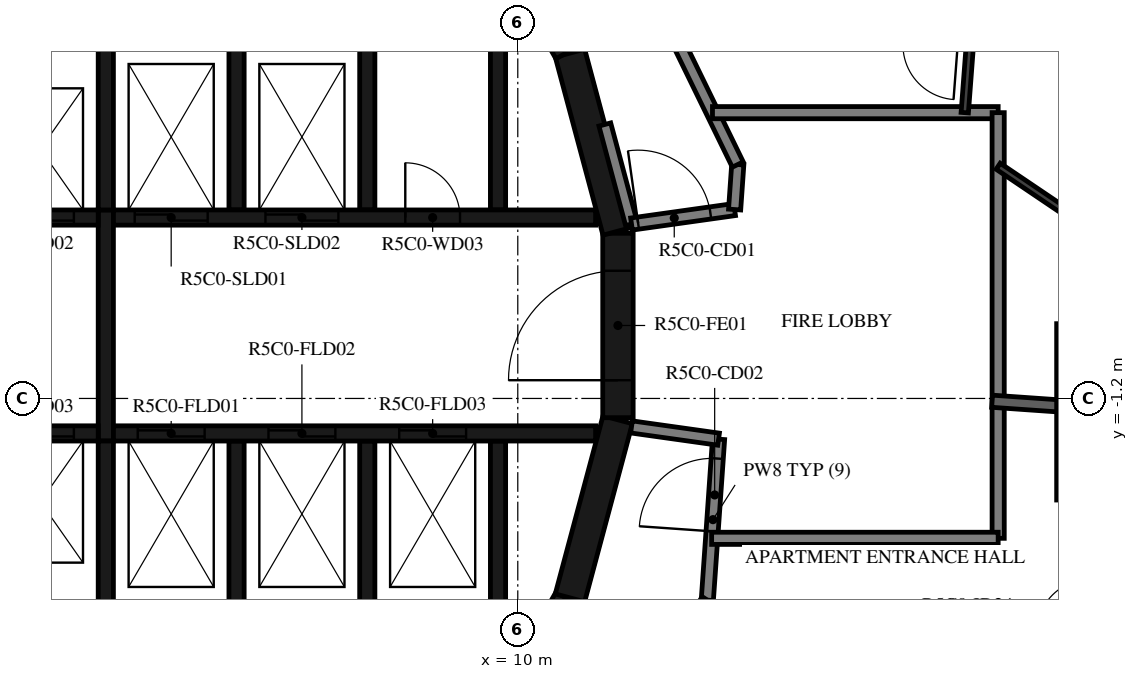
"""IFC4 building model, lengths in metres.
Left out: names, types, materials, properties, quantities, classifications, styles, units other than length and angle.
Written with IfcOpenShell. Run it as: python <this file> out.ifc"""

import sys

from ifc_helpers import new_model, si_unit, direction, frame, frame_2d, origin, place, context, subcontext, project, spatial, polyline, rectangle, outline, extrude, element, fill, save


model = new_model("IFC4")
c1 = context("Model", 3, precision=1e-05, world=origin(), true_north=direction((0.0, 1.0)))
c2 = subcontext(c1, "Body", "Model", "MODEL_VIEW")
j1 = project(units=[si_unit("LENGTHUNIT", "METRE"), si_unit("PLANEANGLEUNIT", "RADIAN")], contexts=[c1])
p1 = place(None, origin())
s1 = spatial("IfcSite", under=j1, at=p1, CompositionType="ELEMENT")
p2 = place(p1, origin())
s2 = spatial("IfcBuilding", under=s1, at=p2, CompositionType="ELEMENT")
p3 = place(p2, frame((0.0, 0.0, 209.4)))
s3 = spatial("IfcBuildingStorey", under=s2, at=p3, CompositionType="ELEMENT", Elevation=209.4)
for number, where, z_axis, x_axis in (
    (1, (9.329, -7.137, 0.0), (0.0, 0.0, 1.0), (0.5, 0.866, 0.0)),
    (2, (10.858, -4.479, 0.0), (0.0, 0.0, 1.0), (0.259, 0.966, 0.0)),
):
    element("IfcWall", number, at=place(p3, frame(where, z_axis=z_axis, x_axis=x_axis)), inside=s3, PredefinedType="SHEAR", context=c2, shape_type="SweptSolid", body=[
        extrude(rectangle(XDim=3.033, YDim=0.5, at=frame_2d((1.516, 0.0))), origin(), (0.0, 0.0, 1.0), 3.12),
    ])
p4 = place(p3, frame((11.647, -1.516, 0.0), z_axis=(0.0, 0.0, 1.0), x_axis=(0.0, 1.0, 0.0)))
e3 = element("IfcWall", 3, at=p4, inside=s3, PredefinedType="SHEAR", context=c2, shape_type="SweptSolid", body=[
    extrude(rectangle(XDim=3.033, YDim=0.5, at=frame_2d((1.516, 0.0))), origin(), (0.0, 0.0, 1.0), 3.12),
])
p5 = place(p4, frame((0.616, 0.0, 0.0)))
e4 = element("IfcOpeningElement", 4, at=p5, cuts=e3, PredefinedType="OPENING", context=c2, shape_type="SweptSolid", body=[
    extrude(rectangle(XDim=1.8, YDim=2.1, at=frame_2d((0.9, 1.05))), frame((0.0, 0.26, 0.0), z_axis=(0.0, -1.0, 0.0), x_axis=(1.0, 0.0, 0.0)), (0.0, 0.0, 1.0), 0.52),
])
for number, where, z_axis, x_axis in (
    (5, (11.643, 1.55, 0.0), (0.0, 0.0, 1.0), (-0.259, 0.966, 0.0)),
    (6, (10.845, 4.51, 0.0), (0.0, 0.0, 1.0), (-0.5, 0.866, 0.0)),
):
    element("IfcWall", number, at=place(p3, frame(where, z_axis=z_axis, x_axis=x_axis)), inside=s3, PredefinedType="SHEAR", context=c2, shape_type="SweptSolid", body=[
        extrude(rectangle(XDim=3.033, YDim=0.5, at=frame_2d((1.516, 0.0))), origin(), (0.0, 0.0, 1.0), 3.12),
    ])
p6 = place(p3, origin())
e7 = element("IfcWall", 7, at=p6, inside=s3, PredefinedType="SHEAR", context=c2, shape_type="SweptSolid", body=[
    extrude(outline(polyline([(-9.55, 4.8), (-5.5, 4.8), (-5.5, 1.9), (-5.25, 1.9), (-5.25, 4.8), (-1.2, 4.8), (-1.2, 1.9), (-0.95, 1.9), (-0.95, 4.8), (0.95, 4.8), (0.95, 1.9), (1.2, 1.9), (1.2, 4.8), (3.1, 4.8), (3.1, 1.9), (3.35, 1.9), (3.35, 4.8), (5.25, 4.8), (5.25, 1.9), (5.5, 1.9), (5.5, 4.8), (7.4, 4.8), (7.4, 1.9), (7.65, 1.9), (7.65, 4.8), (9.55, 4.8), (9.55, 1.9), (9.8, 1.9), (9.8, 4.8), (9.8, 5.05), (-9.8, 5.05), (-9.8, 4.8), (-9.8, 1.9), (-9.55, 1.9), (-9.55, 4.8)])), origin(), (0.0, 0.0, 1.0), 3.12),
])
p7 = place(p3, origin())
e8 = element("IfcWall", 8, at=p7, inside=s3, PredefinedType="SHEAR", context=c2, shape_type="SweptSolid", body=[
    extrude(outline(polyline([(9.8, -5.05), (9.8, -4.8), (9.8, -1.9), (9.55, -1.9), (9.55, -4.8), (7.65, -4.8), (7.65, -1.9), (7.4, -1.9), (7.4, -4.8), (5.5, -4.8), (5.5, -1.9), (5.25, -1.9), (5.25, -4.8), (3.35, -4.8), (3.35, -1.9), (3.1, -1.9), (3.1, -4.8), (1.2, -4.8), (1.2, -1.9), (0.95, -1.9), (0.95, -4.8), (-5.25, -4.8), (-5.25, -1.9), (-5.5, -1.9), (-5.5, -4.8), (-7.4, -4.8), (-7.4, -1.9), (-7.65, -1.9), (-7.65, -4.8), (-9.55, -4.8), (-9.55, -1.9), (-9.8, -1.9), (-9.8, -4.8), (-9.8, -5.05), (9.8, -5.05)])), origin(), (0.0, 0.0, 1.0), 3.12),
])
p8 = place(p3, frame((-11.28, 1.775, 0.0), z_axis=(0.0, 0.0, 1.0), x_axis=(1.0, 0.0, 0.0)))
e9 = element("IfcWall", 9, at=p8, inside=s3, PredefinedType="SHEAR", context=c2, shape_type="SweptSolid", body=[
    extrude(rectangle(XDim=14.38, YDim=0.25, at=frame_2d((7.19, 0.0))), origin(), (0.0, 0.0, 1.0), 3.12),
])
p9 = place(p8, frame((10.73, 0.0, 0.0)))
e10 = element("IfcOpeningElement", 10, at=p9, cuts=e9, PredefinedType="OPENING", context=c2, shape_type="SweptSolid", body=[
    extrude(rectangle(XDim=1.1, YDim=2.1, at=frame_2d((0.55, 1.05))), frame((0.0, 0.135, 0.0), z_axis=(0.0, -1.0, 0.0), x_axis=(1.0, 0.0, 0.0)), (0.0, 0.0, 1.0), 0.27),
])
p10 = place(p8, frame((12.88, 0.0, 0.0)))
e11 = element("IfcOpeningElement", 11, at=p10, cuts=e9, PredefinedType="OPENING", context=c2, shape_type="SweptSolid", body=[
    extrude(rectangle(XDim=1.1, YDim=2.1, at=frame_2d((0.55, 1.05))), frame((0.0, 0.135, 0.0), z_axis=(0.0, -1.0, 0.0), x_axis=(1.0, 0.0, 0.0)), (0.0, 0.0, 1.0), 0.27),
])
p11 = place(p8, frame((3.305, 0.0, 0.0)))
e12 = element("IfcOpeningElement", 12, at=p11, cuts=e9, PredefinedType="OPENING", context=c2, shape_type="SweptSolid", body=[
    extrude(rectangle(XDim=0.9, YDim=2.1, at=frame_2d((0.45, 1.05))), frame((0.0, 0.135, 0.0), z_axis=(0.0, -1.0, 0.0), x_axis=(1.0, 0.0, 0.0)), (0.0, 0.0, 1.0), 0.27),
])
p12 = place(p8, frame((7.605, 0.0, 0.0)))
e13 = element("IfcOpeningElement", 13, at=p12, cuts=e9, PredefinedType="OPENING", context=c2, shape_type="SweptSolid", body=[
    extrude(rectangle(XDim=0.9, YDim=2.1, at=frame_2d((0.45, 1.05))), frame((0.0, 0.135, 0.0), z_axis=(0.0, -1.0, 0.0), x_axis=(1.0, 0.0, 0.0)), (0.0, 0.0, 1.0), 0.27),
])
p13 = place(p3, frame((3.35, 1.775, 0.0), z_axis=(0.0, 0.0, 1.0), x_axis=(1.0, 0.0, 0.0)))
e14 = element("IfcWall", 14, at=p13, inside=s3, PredefinedType="SHEAR", context=c2, shape_type="SweptSolid", body=[
    extrude(rectangle(XDim=7.93, YDim=0.25, at=frame_2d((3.965, 0.0))), origin(), (0.0, 0.0, 1.0), 3.12),
])
p14 = place(p13, frame((0.35, 0.0, 0.0)))
e15 = element("IfcOpeningElement", 15, at=p14, cuts=e14, PredefinedType="OPENING", context=c2, shape_type="SweptSolid", body=[
    extrude(rectangle(XDim=1.2, YDim=2.4, at=frame_2d((0.6, 1.2))), frame((0.0, 0.135, 0.0), z_axis=(0.0, -1.0, 0.0), x_axis=(1.0, 0.0, 0.0)), (0.0, 0.0, 1.0), 0.27),
])
p15 = place(p13, frame((2.5, 0.0, 0.0)))
e16 = element("IfcOpeningElement", 16, at=p15, cuts=e14, PredefinedType="OPENING", context=c2, shape_type="SweptSolid", body=[
    extrude(rectangle(XDim=1.2, YDim=2.4, at=frame_2d((0.6, 1.2))), frame((0.0, 0.135, 0.0), z_axis=(0.0, -1.0, 0.0), x_axis=(1.0, 0.0, 0.0)), (0.0, 0.0, 1.0), 0.27),
])
p16 = place(p13, frame((4.8, 0.0, 0.0)))
e17 = element("IfcOpeningElement", 17, at=p16, cuts=e14, PredefinedType="OPENING", context=c2, shape_type="SweptSolid", body=[
    extrude(rectangle(XDim=0.9, YDim=2.1, at=frame_2d((0.45, 1.05))), frame((0.0, 0.135, 0.0), z_axis=(0.0, -1.0, 0.0), x_axis=(1.0, 0.0, 0.0)), (0.0, 0.0, 1.0), 0.27),
])
p17 = place(p3, frame((-11.28, -1.775, 0.0), z_axis=(0.0, 0.0, 1.0), x_axis=(1.0, 0.0, 0.0)))
e18 = element("IfcWall", 18, at=p17, inside=s3, PredefinedType="SHEAR", context=c2, shape_type="SweptSolid", body=[
    extrude(rectangle(XDim=14.38, YDim=0.25, at=frame_2d((7.19, 0.0))), origin(), (0.0, 0.0, 1.0), 3.12),
])
p18 = place(p17, frame((12.88, 0.0, 0.0)))
e19 = element("IfcOpeningElement", 19, at=p18, cuts=e18, PredefinedType="OPENING", context=c2, shape_type="SweptSolid", body=[
    extrude(rectangle(XDim=1.1, YDim=2.1, at=frame_2d((0.55, 1.05))), frame((0.0, 0.135, 0.0), z_axis=(0.0, -1.0, 0.0), x_axis=(1.0, 0.0, 0.0)), (0.0, 0.0, 1.0), 0.27),
])
p19 = place(p17, frame((8.68, 0.0, 0.0)))
e20 = element("IfcOpeningElement", 20, at=p19, cuts=e18, PredefinedType="OPENING", context=c2, shape_type="SweptSolid", body=[
    extrude(rectangle(XDim=0.9, YDim=2.1, at=frame_2d((0.45, 1.05))), frame((0.0, 0.135, 0.0), z_axis=(0.0, -1.0, 0.0), x_axis=(1.0, 0.0, 0.0)), (0.0, 0.0, 1.0), 0.27),
])
p20 = place(p3, frame((3.35, -1.775, 0.0), z_axis=(0.0, 0.0, 1.0), x_axis=(1.0, 0.0, 0.0)))
e21 = element("IfcWall", 21, at=p20, inside=s3, PredefinedType="SHEAR", context=c2, shape_type="SweptSolid", body=[
    extrude(rectangle(XDim=7.93, YDim=0.25, at=frame_2d((3.965, 0.0))), origin(), (0.0, 0.0, 1.0), 3.12),
])
p21 = place(p20, frame((0.4, 0.0, 0.0)))
e22 = element("IfcOpeningElement", 22, at=p21, cuts=e21, PredefinedType="OPENING", context=c2, shape_type="SweptSolid", body=[
    extrude(rectangle(XDim=1.1, YDim=2.4, at=frame_2d((0.55, 1.2))), frame((0.0, 0.135, 0.0), z_axis=(0.0, -1.0, 0.0), x_axis=(1.0, 0.0, 0.0)), (0.0, 0.0, 1.0), 0.27),
])
p22 = place(p20, frame((2.55, 0.0, 0.0)))
e23 = element("IfcOpeningElement", 23, at=p22, cuts=e21, PredefinedType="OPENING", context=c2, shape_type="SweptSolid", body=[
    extrude(rectangle(XDim=1.1, YDim=2.4, at=frame_2d((0.55, 1.2))), frame((0.0, 0.135, 0.0), z_axis=(0.0, -1.0, 0.0), x_axis=(1.0, 0.0, 0.0)), (0.0, 0.0, 1.0), 0.27),
])
p23 = place(p20, frame((4.7, 0.0, 0.0)))
e24 = element("IfcOpeningElement", 24, at=p23, cuts=e21, PredefinedType="OPENING", context=c2, shape_type="SweptSolid", body=[
    extrude(rectangle(XDim=1.1, YDim=2.4, at=frame_2d((0.55, 1.2))), frame((0.0, 0.135, 0.0), z_axis=(0.0, -1.0, 0.0), x_axis=(1.0, 0.0, 0.0)), (0.0, 0.0, 1.0), 0.27),
])
p24 = place(p3, frame((3.225, -1.9, 0.0), z_axis=(0.0, 0.0, 1.0), x_axis=(0.0, 1.0, 0.0)))
e25 = element("IfcWall", 25, at=p24, inside=s3, PredefinedType="SHEAR", context=c2, shape_type="SweptSolid", body=[
    extrude(rectangle(XDim=3.8, YDim=0.25, at=frame_2d((1.9, 0.0))), origin(), (0.0, 0.0, 1.0), 3.12),
])
p25 = place(p3, frame((11.87, 1.668, 0.0), z_axis=(0.0, 0.0, 1.0), x_axis=(-0.258836880648, 0.965921047093, 0.0)))
e26 = element("IfcWall", 26, at=p25, inside=s3, PredefinedType="STANDARD", context=c2, shape_type="SweptSolid", body=[
    extrude(rectangle(XDim=1.695, YDim=0.2, at=frame_2d((0.848, 0.0))), origin(), (0.0, 0.0, 1.0), 3.12),
])
p26 = place(p3, frame((11.87, 1.668, 0.0), z_axis=(0.0, 0.0, 1.0), x_axis=(0.990271931984, 0.139145609792, 0.0)))
e27 = element("IfcWall", 27, at=p26, inside=s3, PredefinedType="STANDARD", context=c2, shape_type="SweptSolid", body=[
    extrude(rectangle(XDim=1.712, YDim=0.2, at=frame_2d((0.856, 0.0))), origin(), (0.0, 0.0, 1.0), 3.12),
])
p27 = place(p26, frame((0.11, 0.0, 0.0)))
e28 = element("IfcOpeningElement", 28, at=p27, cuts=e27, PredefinedType="OPENING", context=c2, shape_type="SweptSolid", body=[
    extrude(rectangle(XDim=1.2, YDim=2.1, at=frame_2d((0.6, 1.05))), frame((0.0, 0.11, 0.0), z_axis=(0.0, -1.0, 0.0), x_axis=(1.0, 0.0, 0.0)), (0.0, 0.0, 1.0), 0.22),
])
p28 = place(p3, frame((13.566, 1.906, 0.0), z_axis=(0.0, 0.0, 1.0), x_axis=(0.07005495793, 0.997543133338, 0.0)))
e29 = element("IfcWall", 29, at=p28, inside=s3, PredefinedType="STANDARD", context=c2, shape_type="SweptSolid", body=[
    extrude(rectangle(XDim=0.742, YDim=0.2, at=frame_2d((0.371, 0.0))), origin(), (0.0, 0.0, 1.0), 3.12),
])
p29 = place(p3, frame((13.618, 2.647, 0.0), z_axis=(0.0, 0.0, 1.0), x_axis=(-0.438366026218, 0.898796543751, 0.0)))
e30 = element("IfcWall", 30, at=p29, inside=s3, PredefinedType="STANDARD", context=c2, shape_type="SweptSolid", body=[
    extrude(rectangle(XDim=7.181, YDim=0.2, at=frame_2d((3.591, 0.0))), origin(), (0.0, 0.0, 1.0), 3.12),
])
p30 = place(p3, frame((13.117, -4.517, 0.0), z_axis=(0.0, 0.0, 1.0), x_axis=(0.069736659613, 0.997565435601, 0.0)))
e31 = element("IfcWall", 31, at=p30, inside=s3, PredefinedType="STANDARD", context=c2, shape_type="SweptSolid", body=[
    extrude(rectangle(XDim=2.654, YDim=0.2, at=frame_2d((1.327, 0.0))), origin(), (0.0, 0.0, 1.0), 3.12),
])
p31 = place(p30, frame((1.134, 0.0, 0.0)))
e32 = element("IfcOpeningElement", 32, at=p31, cuts=e31, PredefinedType="OPENING", context=c2, shape_type="SweptSolid", body=[
    extrude(rectangle(XDim=1.2, YDim=2.1, at=frame_2d((0.6, 1.05))), frame((0.0, 0.11, 0.0), z_axis=(0.0, -1.0, 0.0), x_axis=(1.0, 0.0, 0.0)), (0.0, 0.0, 1.0), 0.22),
])
p32 = place(p3, frame((13.302, -1.869, 0.0), z_axis=(0.0, 0.0, 1.0), x_axis=(-0.990274397042, 0.13912806533, 0.0)))
e33 = element("IfcWall", 33, at=p32, inside=s3, PredefinedType="STANDARD", context=c2, shape_type="SweptSolid", body=[
    extrude(rectangle(XDim=1.446, YDim=0.2, at=frame_2d((0.723, 0.0))), origin(), (0.0, 0.0, 1.0), 3.12),
])
p33 = place(p3, frame((9.101, -10.47, 0.0), z_axis=(0.0, 0.0, 1.0), x_axis=(0.559195469534, 0.829035841718, 0.0)))
e34 = element("IfcWall", 34, at=p33, inside=s3, PredefinedType="STANDARD", context=c2, shape_type="SweptSolid", body=[
    extrude(rectangle(XDim=7.181, YDim=0.2, at=frame_2d((3.591, 0.0))), origin(), (0.0, 0.0, 1.0), 3.12),
])
p34 = place(p3, frame((17.9, 3.5, 0.0), z_axis=(0.0, 0.0, 1.0), x_axis=(-1.0, 0.0, 0.0)))
e35 = element("IfcWall", 35, at=p34, inside=s3, PredefinedType="STANDARD", context=c2, shape_type="SweptSolid", body=[
    extrude(rectangle(XDim=4.698, YDim=0.2, at=frame_2d((2.349, 0.0))), origin(), (0.0, 0.0, 1.0), 3.12),
])
p35 = place(p3, frame((17.9, -3.5, 0.0), z_axis=(0.0, 0.0, 1.0), x_axis=(0.0, 1.0, 0.0)))
e36 = element("IfcWall", 36, at=p35, inside=s3, PredefinedType="STANDARD", context=c2, shape_type="SweptSolid", body=[
    extrude(rectangle(XDim=7.0, YDim=0.2, at=frame_2d((3.5, 0.0))), origin(), (0.0, 0.0, 1.0), 3.12),
])
p36 = place(p3, frame((13.188, -3.5, 0.0), z_axis=(0.0, 0.0, 1.0), x_axis=(1.0, 0.0, 0.0)))
e37 = element("IfcWall", 37, at=p36, inside=s3, PredefinedType="STANDARD", context=c2, shape_type="SweptSolid", body=[
    extrude(rectangle(XDim=4.712, YDim=0.2, at=frame_2d((2.356, 0.0))), origin(), (0.0, 0.0, 1.0), 3.12),
])
p37 = place(p3, frame((17.8, -1.246, 0.0), z_axis=(0.0, 0.0, 1.0), x_axis=(0.997562681713, -0.069776042122, 0.0)))
e38 = element("IfcWall", 38, at=p37, inside=s3, PredefinedType="STANDARD", context=c2, shape_type="SweptSolid", body=[
    extrude(rectangle(XDim=1.144, YDim=0.2, at=frame_2d((0.572, 0.0))), origin(), (0.0, 0.0, 1.0), 3.12),
])
p38 = place(p3, frame((17.351, 3.5, 0.0), z_axis=(0.0, 0.0, 1.0), x_axis=(0.075374124137, 0.997155324616, 0.0)))
e39 = element("IfcWall", 39, at=p38, inside=s3, PredefinedType="PARTITIONING", context=c2, shape_type="SweptSolid", body=[
    extrude(rectangle(XDim=1.101, YDim=0.12, at=frame_2d((0.551, 0.0))), origin(), (0.0, 0.0, 1.0), 3.12),
])
p39 = place(p3, frame((21.141, 0.433, 0.0), z_axis=(0.0, 0.0, 1.0), x_axis=(-0.829049908454, 0.559174614313, 0.0)))
e40 = element("IfcWall", 40, at=p39, inside=s3, PredefinedType="PARTITIONING", context=c2, shape_type="SweptSolid", body=[
    extrude(rectangle(XDim=3.909, YDim=0.12, at=frame_2d((1.955, 0.0))), origin(), (0.0, 0.0, 1.0), 3.12),
])
p40 = place(p39, frame((0.8, 0.0, 0.0)))
e41 = element("IfcOpeningElement", 41, at=p40, cuts=e40, PredefinedType="OPENING", context=c2, shape_type="SweptSolid", body=[
    extrude(rectangle(XDim=0.8, YDim=2.1, at=frame_2d((0.4, 1.05))), frame((0.0, 0.07, 0.0), z_axis=(0.0, -1.0, 0.0), x_axis=(1.0, 0.0, 0.0)), (0.0, 0.0, 1.0), 0.14),
])
p41 = place(p3, origin())
e42 = element("IfcWall", 42, at=p41, inside=s3, PredefinedType="STANDARD", context=c2, shape_type="SweptSolid", body=[
    extrude(outline(polyline([(21.762, 0.03), (21.762, -2.87), (18.862, -2.87), (18.862, 0.03), (21.762, 0.03)]), holes=[polyline([(19.062, -2.67), (21.562, -2.67), (21.562, -0.17), (19.062, -0.17), (19.062, -2.67)])]), origin(), (0.0, 0.0, 1.0), 3.12),
])
p42 = place(p5, origin())
e43 = element("IfcDoor", 43, at=p42, inside=s3, OperationType="DOUBLE_DOOR_SINGLE_SWING", PredefinedType="DOOR", context=c2, shape_type="SweptSolid", body=[
    extrude(rectangle(XDim=1.8, YDim=2.1, at=frame_2d((0.9, 1.05))), frame((0.0, 0.025, 0.0), z_axis=(0.0, -1.0, 0.0), x_axis=(1.0, 0.0, 0.0)), (0.0, 0.0, 1.0), 0.05),
])
fill(e4, e43)
p43 = place(p10, origin())
e44 = element("IfcDoor", 44, at=p43, inside=s3, OperationType="DOUBLE_DOOR_SLIDING", PredefinedType="DOOR", context=c2, shape_type="SweptSolid", body=[
    extrude(rectangle(XDim=1.1, YDim=2.1, at=frame_2d((0.55, 1.05))), frame((0.0, 0.025, 0.0), z_axis=(0.0, -1.0, 0.0), x_axis=(1.0, 0.0, 0.0)), (0.0, 0.0, 1.0), 0.05),
])
fill(e11, e44)
p44 = place(p14, origin())
e45 = element("IfcDoor", 45, at=p44, inside=s3, OperationType="DOUBLE_DOOR_SLIDING", PredefinedType="DOOR", context=c2, shape_type="SweptSolid", body=[
    extrude(rectangle(XDim=1.2, YDim=2.4, at=frame_2d((0.6, 1.2))), frame((0.0, 0.025, 0.0), z_axis=(0.0, -1.0, 0.0), x_axis=(1.0, 0.0, 0.0)), (0.0, 0.0, 1.0), 0.05),
])
fill(e15, e45)
p45 = place(p15, origin())
e46 = element("IfcDoor", 46, at=p45, inside=s3, OperationType="DOUBLE_DOOR_SLIDING", PredefinedType="DOOR", context=c2, shape_type="SweptSolid", body=[
    extrude(rectangle(XDim=1.2, YDim=2.4, at=frame_2d((0.6, 1.2))), frame((0.0, 0.025, 0.0), z_axis=(0.0, -1.0, 0.0), x_axis=(1.0, 0.0, 0.0)), (0.0, 0.0, 1.0), 0.05),
])
fill(e16, e46)
p46 = place(p18, origin())
e47 = element("IfcDoor", 47, at=p46, inside=s3, OperationType="DOUBLE_DOOR_SLIDING", PredefinedType="DOOR", context=c2, shape_type="SweptSolid", body=[
    extrude(rectangle(XDim=1.1, YDim=2.1, at=frame_2d((0.55, 1.05))), frame((0.0, 0.025, 0.0), z_axis=(0.0, -1.0, 0.0), x_axis=(1.0, 0.0, 0.0)), (0.0, 0.0, 1.0), 0.05),
])
fill(e19, e47)
p47 = place(p21, origin())
e48 = element("IfcDoor", 48, at=p47, inside=s3, OperationType="DOUBLE_DOOR_SLIDING", PredefinedType="DOOR", context=c2, shape_type="SweptSolid", body=[
    extrude(rectangle(XDim=1.1, YDim=2.4, at=frame_2d((0.55, 1.2))), frame((0.0, 0.025, 0.0), z_axis=(0.0, -1.0, 0.0), x_axis=(1.0, 0.0, 0.0)), (0.0, 0.0, 1.0), 0.05),
])
fill(e22, e48)
p48 = place(p22, origin())
e49 = element("IfcDoor", 49, at=p48, inside=s3, OperationType="DOUBLE_DOOR_SLIDING", PredefinedType="DOOR", context=c2, shape_type="SweptSolid", body=[
    extrude(rectangle(XDim=1.1, YDim=2.4, at=frame_2d((0.55, 1.2))), frame((0.0, 0.025, 0.0), z_axis=(0.0, -1.0, 0.0), x_axis=(1.0, 0.0, 0.0)), (0.0, 0.0, 1.0), 0.05),
])
fill(e23, e49)
p49 = place(p23, origin())
e50 = element("IfcDoor", 50, at=p49, inside=s3, OperationType="DOUBLE_DOOR_SLIDING", PredefinedType="DOOR", context=c2, shape_type="SweptSolid", body=[
    extrude(rectangle(XDim=1.1, YDim=2.4, at=frame_2d((0.55, 1.2))), frame((0.0, 0.025, 0.0), z_axis=(0.0, -1.0, 0.0), x_axis=(1.0, 0.0, 0.0)), (0.0, 0.0, 1.0), 0.05),
])
fill(e24, e50)
p50 = place(p16, origin())
e51 = element("IfcDoor", 51, at=p50, inside=s3, OperationType="SINGLE_SWING_LEFT", PredefinedType="DOOR", context=c2, shape_type="SweptSolid", body=[
    extrude(rectangle(XDim=0.9, YDim=2.1, at=frame_2d((0.45, 1.05))), frame((0.0, 0.025, 0.0), z_axis=(0.0, -1.0, 0.0), x_axis=(1.0, 0.0, 0.0)), (0.0, 0.0, 1.0), 0.05),
])
fill(e17, e51)
p51 = place(p27, origin())
e52 = element("IfcDoor", 52, at=p51, inside=s3, OperationType="DOUBLE_DOOR_SINGLE_SWING", PredefinedType="DOOR", context=c2, shape_type="SweptSolid", body=[
    extrude(rectangle(XDim=1.2, YDim=2.1, at=frame_2d((0.6, 1.05))), frame((0.0, 0.025, 0.0), z_axis=(0.0, -1.0, 0.0), x_axis=(1.0, 0.0, 0.0)), (0.0, 0.0, 1.0), 0.05),
])
fill(e28, e52)
p52 = place(p31, origin())
e53 = element("IfcDoor", 53, at=p52, inside=s3, OperationType="DOUBLE_DOOR_SINGLE_SWING", PredefinedType="DOOR", context=c2, shape_type="SweptSolid", body=[
    extrude(rectangle(XDim=1.2, YDim=2.1, at=frame_2d((0.6, 1.05))), frame((0.0, 0.025, 0.0), z_axis=(0.0, -1.0, 0.0), x_axis=(1.0, 0.0, 0.0)), (0.0, 0.0, 1.0), 0.05),
])
fill(e32, e53)
save(model, sys.argv[1])
